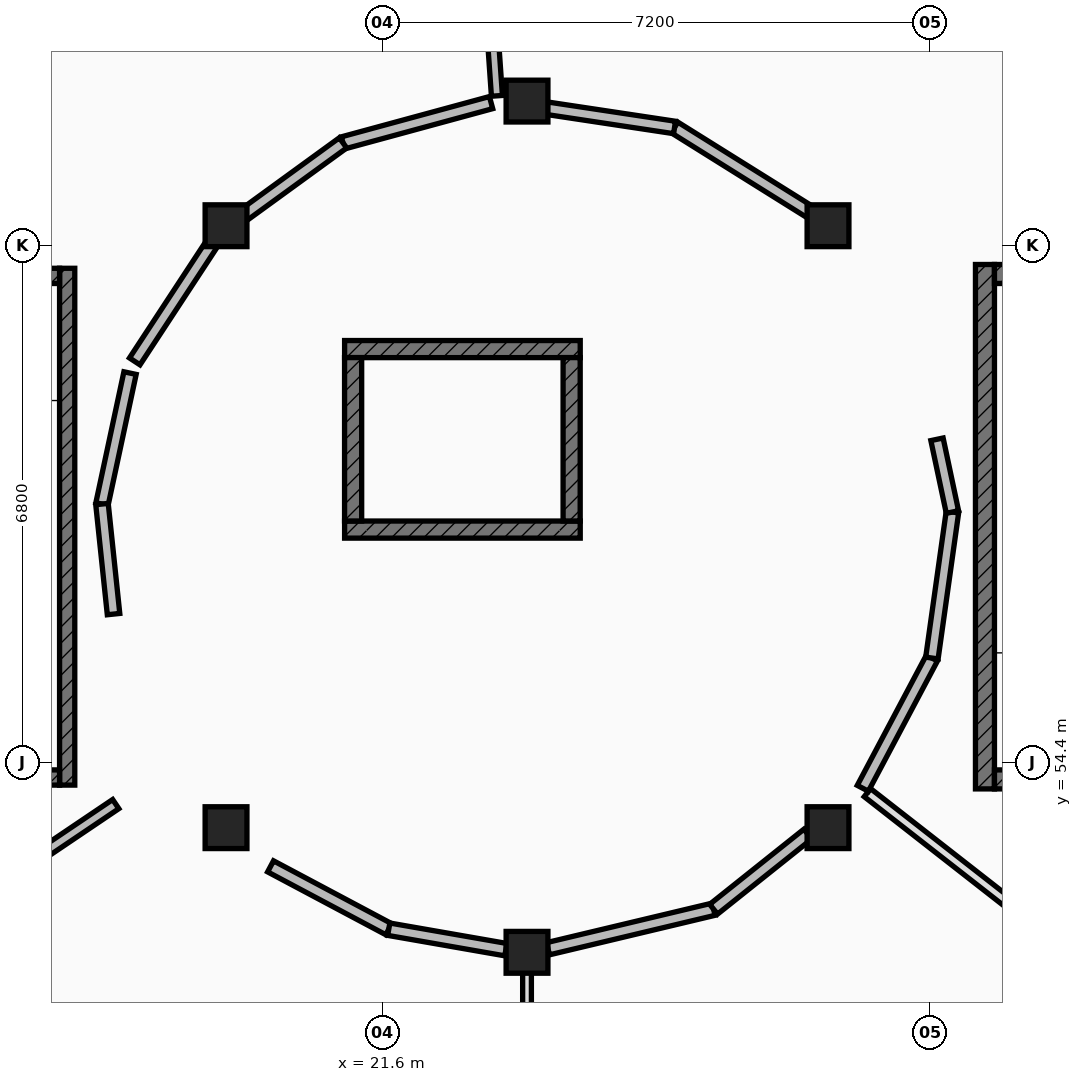
"""IFC4 building model, lengths in metres.
Left out: names, types, materials, properties, quantities, classifications, styles, units other than length and angle.
Written with IfcOpenShell. Run it as: python <this file> out.ifc"""

import sys

from ifc_helpers import new_model, si_unit, direction, frame, frame_2d, origin, origin_2d, place, context, subcontext, project, spatial, rectangle, extrude, element, fill, save


model = new_model("IFC4")
c1 = context("Model", 3, precision=1e-05, world=origin(), true_north=direction((0.0, 1.0)))
c2 = subcontext(c1, "Body", "Model", "MODEL_VIEW")
j1 = project(units=[si_unit("LENGTHUNIT", "METRE"), si_unit("PLANEANGLEUNIT", "RADIAN")], contexts=[c1])
p1 = place(None, origin())
s1 = spatial("IfcSite", under=j1, at=p1, CompositionType="ELEMENT")
p2 = place(p1, origin())
s2 = spatial("IfcBuilding", under=s1, at=p2, CompositionType="ELEMENT")
p3 = place(p2, frame((0.0, 0.0, -4.55)))
s3 = spatial("IfcBuildingStorey", under=s2, at=p3, CompositionType="ELEMENT", Elevation=-4.55)
for number, where, z_axis, x_axis in (
    (1, (27.46, 61.46, 0.0), (0.0, 0.0, 1.0), (1.0, 0.0, 0.0)),
    (2, (23.5, 63.1, 0.0), (0.0, 0.0, 1.0), (1.0, 0.0, 0.0)),
    (3, (19.54, 61.46, 0.0), (0.0, 0.0, 1.0), (1.0, 0.0, 0.0)),
    (4, (19.54, 53.54, 0.0), (0.0, 0.0, 1.0), (1.0, 0.0, 0.0)),
    (5, (23.5, 51.9, 0.0), (0.0, 0.0, 1.0), (1.0, 0.0, 0.0)),
    (6, (27.46, 53.54, 0.0), (0.0, 0.0, 1.0), (1.0, 0.0, 0.0)),
):
    element("IfcColumn", number, at=place(p3, frame(where, z_axis=z_axis, x_axis=x_axis)), inside=s3, PredefinedType="COLUMN", context=c2, shape_type="SweptSolid", body=[
        extrude(rectangle(XDim=0.55, YDim=0.55, at=origin_2d()), origin(), (0.0, 0.0, 1.0), 4.55),
    ])
p4 = place(p3, frame((29.525, 60.95, 0.0), z_axis=(0.0, 0.0, 1.0), x_axis=(0.0, -1.0, 0.0)))
e7 = element("IfcWall", 7, at=p4, inside=s3, PredefinedType="SHEAR", context=c2, shape_type="SweptSolid", body=[
    extrude(rectangle(XDim=6.9, YDim=0.25, at=frame_2d((3.45, 0.0))), origin(), (0.0, 0.0, 1.0), 4.135),
])
p5 = place(p4, frame((0.43, 0.0, 0.0)))
e8 = element("IfcOpeningElement", 8, at=p5, cuts=e7, PredefinedType="OPENING", context=c2, shape_type="SweptSolid", body=[
    extrude(rectangle(XDim=1.1, YDim=2.15, at=frame_2d((0.55, 1.075))), frame((0.0, 0.135, 0.0), z_axis=(0.0, -1.0, 0.0), x_axis=(1.0, 0.0, 0.0)), (0.0, 0.0, 1.0), 0.27),
])
for number, where, z_axis, x_axis in (
    (9, (29.65, 60.825, 0.0), (0.0, 0.0, 1.0), (1.0, 0.0, 0.0)),
    (10, (29.65, 54.175, 0.0), (0.0, 0.0, 1.0), (1.0, 0.0, 0.0)),
):
    element("IfcWall", number, at=place(p3, frame(where, z_axis=z_axis, x_axis=x_axis)), inside=s3, PredefinedType="SHEAR", context=c2, shape_type="SweptSolid", body=[
        extrude(rectangle(XDim=2.9, YDim=0.25, at=frame_2d((1.45, 0.0))), origin(), (0.0, 0.0, 1.0), 4.135),
    ])
p6 = place(p3, frame((17.45, 54.1, 0.0), z_axis=(0.0, 0.0, 1.0), x_axis=(0.0, 1.0, 0.0)))
e11 = element("IfcWall", 11, at=p6, inside=s3, PredefinedType="SHEAR", context=c2, shape_type="SweptSolid", body=[
    extrude(rectangle(XDim=6.8, YDim=0.2, at=frame_2d((3.4, 0.0))), origin(), (0.0, 0.0, 1.0), 4.135),
])
p7 = place(p6, frame((0.38, 0.0, 0.0)))
e12 = element("IfcOpeningElement", 12, at=p7, cuts=e11, PredefinedType="OPENING", context=c2, shape_type="SweptSolid", body=[
    extrude(rectangle(XDim=1.05, YDim=2.15, at=frame_2d((0.525, 1.075))), frame((0.0, 0.11, 0.0), z_axis=(0.0, -1.0, 0.0), x_axis=(1.0, 0.0, 0.0)), (0.0, 0.0, 1.0), 0.22),
])
for number, where, z_axis, x_axis in (
    (13, (17.35, 54.2, 0.0), (0.0, 0.0, 1.0), (-1.0, 0.0, 0.0)),
    (14, (17.35, 60.8, 0.0), (0.0, 0.0, 1.0), (-1.0, 0.0, 0.0)),
):
    element("IfcWall", number, at=place(p3, frame(where, z_axis=z_axis, x_axis=x_axis)), inside=s3, PredefinedType="SHEAR", context=c2, shape_type="SweptSolid", body=[
        extrude(rectangle(XDim=2.9, YDim=0.2, at=frame_2d((1.45, 0.0))), origin(), (0.0, 0.0, 1.0), 4.135),
    ])
p8 = place(p3, frame((21.1, 57.462, 0.0), z_axis=(0.0, 0.0, 1.0), x_axis=(1.0, 0.0, 0.0)))
e15 = element("IfcWall", 15, at=p8, inside=s3, PredefinedType="SHEAR", context=c2, shape_type="SweptSolid", body=[
    extrude(rectangle(XDim=3.1, YDim=0.225, at=frame_2d((1.55, 0.0))), origin(), (0.0, 0.0, 1.0), 4.135),
])
p9 = place(p8, frame((0.95, 0.0, 0.0)))
e16 = element("IfcOpeningElement", 16, at=p9, cuts=e15, PredefinedType="OPENING", context=c2, shape_type="SweptSolid", body=[
    extrude(rectangle(XDim=1.2, YDim=2.2, at=frame_2d((0.6, 1.1))), frame((0.0, 0.123, 0.0), z_axis=(0.0, -1.0, 0.0), x_axis=(1.0, 0.0, 0.0)), (0.0, 0.0, 1.0), 0.245),
])
p10 = place(p3, frame((21.1, 59.837, 0.0), z_axis=(0.0, 0.0, 1.0), x_axis=(1.0, 0.0, 0.0)))
e17 = element("IfcWall", 17, at=p10, inside=s3, PredefinedType="SHEAR", context=c2, shape_type="SweptSolid", body=[
    extrude(rectangle(XDim=3.1, YDim=0.225, at=frame_2d((1.55, 0.0))), origin(), (0.0, 0.0, 1.0), 4.135),
])
for number, where, z_axis, x_axis in (
    (18, (21.212, 57.575, 0.0), (0.0, 0.0, 1.0), (0.0, 1.0, 0.0)),
    (19, (24.087, 57.575, 0.0), (0.0, 0.0, 1.0), (0.0, 1.0, 0.0)),
):
    element("IfcWall", number, at=place(p3, frame(where, z_axis=z_axis, x_axis=x_axis)), inside=s3, PredefinedType="SHEAR", context=c2, shape_type="SweptSolid", body=[
        extrude(rectangle(XDim=2.15, YDim=0.225, at=frame_2d((1.075, 0.0))), origin(), (0.0, 0.0, 1.0), 4.135),
    ])
p11 = place(p3, frame((23.104, 63.169, 0.0), z_axis=(0.0, 0.0, 1.0), x_axis=(-0.069759335413, 0.997563850148, 0.0)))
e20 = element("IfcWall", 20, at=p11, inside=s3, PredefinedType="PARTITIONING", context=c2, shape_type="SweptSolid", body=[
    extrude(rectangle(XDim=4.56, YDim=0.145, at=frame_2d((2.28, 0.0))), origin(), (0.0, 0.0, 1.0), 3.31),
])
p12 = place(p3, frame((18.089, 53.85, 0.0), z_axis=(0.0, 0.0, 1.0), x_axis=(-0.828961502122, -0.559305665982, 0.0)))
e21 = element("IfcWall", 21, at=p12, inside=s3, PredefinedType="PARTITIONING", context=c2, shape_type="SweptSolid", body=[
    extrude(rectangle(XDim=3.712, YDim=0.145, at=frame_2d((1.856, 0.0))), origin(), (0.0, 0.0, 1.0), 3.31),
])
p13 = place(p3, frame((23.5, 51.817, 0.0), z_axis=(0.0, 0.0, 1.0), x_axis=(0.0, -1.0, 0.0)))
e22 = element("IfcWall", 22, at=p13, inside=s3, PredefinedType="PARTITIONING", context=c2, shape_type="SweptSolid", body=[
    extrude(rectangle(XDim=4.615, YDim=0.115, at=frame_2d((2.308, 0.0))), origin(), (0.0, 0.0, 1.0), 3.31),
])
p14 = place(p3, frame((27.978, 54.001, 0.0), z_axis=(0.0, 0.0, 1.0), x_axis=(0.788037233831, -0.615627580681, 0.0)))
e23 = element("IfcWall", 23, at=p14, inside=s3, PredefinedType="PLUMBINGWALL", context=c2, shape_type="SweptSolid", body=[
    extrude(rectangle(XDim=4.605, YDim=0.135, at=frame_2d((2.302, 0.0))), origin(), (0.0, 0.0, 1.0), 3.31),
])
p15 = place(p3, frame((27.238, 61.63, 0.0), z_axis=(0.0, 0.0, 1.0), x_axis=(-0.848030663633, 0.529947161081, 0.0)))
e24 = element("IfcWall", 24, at=p15, inside=s3, PredefinedType="PARTITIONING", context=c2, shape_type="SweptSolid", body=[
    extrude(rectangle(XDim=2.119, YDim=0.165, at=frame_2d((1.06, 0.0))), origin(), (0.0, 0.0, 1.0), 3.31),
])
p16 = place(p15, frame((0.469, 0.0, 0.0)))
e25 = element("IfcOpeningElement", 25, at=p16, cuts=e24, PredefinedType="OPENING", context=c2, shape_type="SweptSolid", body=[
    extrude(rectangle(XDim=1.18, YDim=2.2, at=frame_2d((0.59, 1.1))), frame((0.0, 0.093, 0.0), z_axis=(0.0, -1.0, 0.0), x_axis=(1.0, 0.0, 0.0)), (0.0, 0.0, 1.0), 0.185),
])
p17 = place(p3, frame((25.441, 62.753, 0.0), z_axis=(0.0, 0.0, 1.0), x_axis=(-0.988808298797, 0.149191649331, 0.0)))
e26 = element("IfcWall", 26, at=p17, inside=s3, PredefinedType="PARTITIONING", context=c2, shape_type="SweptSolid", body=[
    extrude(rectangle(XDim=1.697, YDim=0.165, at=frame_2d((0.849, 0.0))), origin(), (0.0, 0.0, 1.0), 3.31),
])
p18 = place(p3, frame((23.027, 63.08, 0.0), z_axis=(0.0, 0.0, 1.0), x_axis=(-0.964919932979, -0.262544325667, 0.0)))
e27 = element("IfcWall", 27, at=p18, inside=s3, PredefinedType="PARTITIONING", context=c2, shape_type="SweptSolid", body=[
    extrude(rectangle(XDim=2.019, YDim=0.165, at=frame_2d((1.009, 0.0))), origin(), (0.0, 0.0, 1.0), 3.31),
])
p19 = place(p18, frame((0.389, 0.0, 0.0)))
e28 = element("IfcOpeningElement", 28, at=p19, cuts=e27, PredefinedType="OPENING", context=c2, shape_type="SweptSolid", body=[
    extrude(rectangle(XDim=1.24, YDim=2.22, at=frame_2d((0.62, 1.11))), frame((0.0, 0.093, 0.0), z_axis=(0.0, -1.0, 0.0), x_axis=(1.0, 0.0, 0.0)), (0.0, 0.0, 1.0), 0.185),
])
p20 = place(p3, frame((21.079, 62.55, 0.0), z_axis=(0.0, 0.0, 1.0), x_axis=(-0.808860869398, -0.588000079895, 0.0)))
e29 = element("IfcWall", 29, at=p20, inside=s3, PredefinedType="PARTITIONING", context=c2, shape_type="SweptSolid", body=[
    extrude(rectangle(XDim=1.607, YDim=0.165, at=frame_2d((0.804, 0.0))), origin(), (0.0, 0.0, 1.0), 3.31),
])
p21 = place(p3, frame((19.366, 61.241, 0.0), z_axis=(0.0, 0.0, 1.0), x_axis=(-0.548365930053, -0.836238486771, 0.0)))
e30 = element("IfcWall", 30, at=p21, inside=s3, PredefinedType="PARTITIONING", context=c2, shape_type="SweptSolid", body=[
    extrude(rectangle(XDim=1.873, YDim=0.165, at=frame_2d((0.936, 0.0))), origin(), (0.0, 0.0, 1.0), 3.31),
])
p22 = place(p3, frame((18.277, 59.521, 0.0), z_axis=(0.0, 0.0, 1.0), x_axis=(-0.209500701014, -0.977808496729, 0.0)))
e31 = element("IfcWall", 31, at=p22, inside=s3, PredefinedType="PARTITIONING", context=c2, shape_type="SweptSolid", body=[
    extrude(rectangle(XDim=1.762, YDim=0.165, at=frame_2d((0.881, 0.0))), origin(), (0.0, 0.0, 1.0), 3.31),
])
p23 = place(p3, frame((17.908, 57.798, 0.0), z_axis=(0.0, 0.0, 1.0), x_axis=(0.10446656428, -0.994528399267, 0.0)))
e32 = element("IfcWall", 32, at=p23, inside=s3, PredefinedType="PARTITIONING", context=c2, shape_type="SweptSolid", body=[
    extrude(rectangle(XDim=1.456, YDim=0.165, at=frame_2d((0.728, 0.0))), origin(), (0.0, 0.0, 1.0), 3.31),
])
p24 = place(p3, frame((20.126, 53.031, 0.0), z_axis=(0.0, 0.0, 1.0), x_axis=(0.882916409472, -0.469530205508, 0.0)))
e33 = element("IfcWall", 33, at=p24, inside=s3, PredefinedType="PARTITIONING", context=c2, shape_type="SweptSolid", body=[
    extrude(rectangle(XDim=1.761, YDim=0.165, at=frame_2d((0.881, 0.0))), origin(), (0.0, 0.0, 1.0), 3.31),
])
p25 = place(p24, frame((0.221, 0.0, 0.0)))
e34 = element("IfcOpeningElement", 34, at=p25, cuts=e33, PredefinedType="OPENING", context=c2, shape_type="SweptSolid", body=[
    extrude(rectangle(XDim=1.32, YDim=2.24, at=frame_2d((0.66, 1.12))), frame((0.0, 0.093, 0.0), z_axis=(0.0, -1.0, 0.0), x_axis=(1.0, 0.0, 0.0)), (0.0, 0.0, 1.0), 0.185),
])
p26 = place(p3, frame((21.681, 52.204, 0.0), z_axis=(0.0, 0.0, 1.0), x_axis=(0.985099289187, -0.171986599601, 0.0)))
e35 = element("IfcWall", 35, at=p26, inside=s3, PredefinedType="PARTITIONING", context=c2, shape_type="SweptSolid", body=[
    extrude(rectangle(XDim=1.564, YDim=0.165, at=frame_2d((0.782, 0.0))), origin(), (0.0, 0.0, 1.0), 3.31),
])
p27 = place(p3, frame((23.776, 51.947, 0.0), z_axis=(0.0, 0.0, 1.0), x_axis=(0.972689167377, 0.232111575903, 0.0)))
e36 = element("IfcWall", 36, at=p27, inside=s3, PredefinedType="PARTITIONING", context=c2, shape_type="SweptSolid", body=[
    extrude(rectangle(XDim=2.24, YDim=0.165, at=frame_2d((1.12, 0.0))), origin(), (0.0, 0.0, 1.0), 3.31),
])
p28 = place(p27, frame((0.68, 0.0, 0.0)))
e37 = element("IfcOpeningElement", 37, at=p28, cuts=e36, PredefinedType="OPENING", context=c2, shape_type="SweptSolid", body=[
    extrude(rectangle(XDim=0.88, YDim=2.1, at=frame_2d((0.44, 1.05))), frame((0.0, 0.093, 0.0), z_axis=(0.0, -1.0, 0.0), x_axis=(1.0, 0.0, 0.0)), (0.0, 0.0, 1.0), 0.185),
])
p29 = place(p3, frame((25.955, 52.467, 0.0), z_axis=(0.0, 0.0, 1.0), x_axis=(0.781844808281, 0.623473091451, 0.0)))
e38 = element("IfcWall", 38, at=p29, inside=s3, PredefinedType="PARTITIONING", context=c2, shape_type="SweptSolid", body=[
    extrude(rectangle(XDim=1.585, YDim=0.165, at=frame_2d((0.792, 0.0))), origin(), (0.0, 0.0, 1.0), 3.31),
])
p30 = place(p3, frame((27.918, 54.058, 0.0), z_axis=(0.0, 0.0, 1.0), x_axis=(0.46852941816, 0.883447895644, 0.0)))
e39 = element("IfcWall", 39, at=p30, inside=s3, PredefinedType="PARTITIONING", context=c2, shape_type="SweptSolid", body=[
    extrude(rectangle(XDim=1.94, YDim=0.165, at=frame_2d((0.97, 0.0))), origin(), (0.0, 0.0, 1.0), 3.31),
])
p31 = place(p30, frame((0.48, 0.0, 0.0)))
e40 = element("IfcOpeningElement", 40, at=p31, cuts=e39, PredefinedType="OPENING", context=c2, shape_type="SweptSolid", body=[
    extrude(rectangle(XDim=0.98, YDim=2.1, at=frame_2d((0.49, 1.05))), frame((0.0, 0.093, 0.0), z_axis=(0.0, -1.0, 0.0), x_axis=(1.0, 0.0, 0.0)), (0.0, 0.0, 1.0), 0.185),
])
p32 = place(p3, frame((28.827, 55.772, 0.0), z_axis=(0.0, 0.0, 1.0), x_axis=(0.139183488293, 0.990266608842, 0.0)))
e41 = element("IfcWall", 41, at=p32, inside=s3, PredefinedType="PARTITIONING", context=c2, shape_type="SweptSolid", body=[
    extrude(rectangle(XDim=1.94, YDim=0.165, at=frame_2d((0.97, 0.0))), origin(), (0.0, 0.0, 1.0), 3.31),
])
p33 = place(p3, frame((29.097, 57.693, 0.0), z_axis=(0.0, 0.0, 1.0), x_axis=(-0.20743182321, 0.978249476729, 0.0)))
e42 = element("IfcWall", 42, at=p33, inside=s3, PredefinedType="PARTITIONING", context=c2, shape_type="SweptSolid", body=[
    extrude(rectangle(XDim=0.978, YDim=0.165, at=frame_2d((0.489, 0.0))), origin(), (0.0, 0.0, 1.0), 3.31),
])
p34 = place(p5, origin())
e43 = element("IfcDoor", 43, at=p34, inside=s3, OperationType="SINGLE_SWING_LEFT", PredefinedType="DOOR", context=c2, shape_type="SweptSolid", body=[
    extrude(rectangle(XDim=1.1, YDim=2.15, at=frame_2d((0.55, 1.075))), frame((0.0, 0.025, 0.0), z_axis=(0.0, -1.0, 0.0), x_axis=(1.0, 0.0, 0.0)), (0.0, 0.0, 1.0), 0.05),
])
fill(e8, e43)
p35 = place(p7, origin())
e44 = element("IfcDoor", 44, at=p35, inside=s3, OperationType="SINGLE_SWING_RIGHT", PredefinedType="DOOR", context=c2, shape_type="SweptSolid", body=[
    extrude(rectangle(XDim=1.05, YDim=2.15, at=frame_2d((0.525, 1.075))), frame((0.0, 0.025, 0.0), z_axis=(0.0, -1.0, 0.0), x_axis=(1.0, 0.0, 0.0)), (0.0, 0.0, 1.0), 0.05),
])
fill(e12, e44)
p36 = place(p9, origin())
e45 = element("IfcDoor", 45, at=p36, inside=s3, OperationType="DOUBLE_DOOR_SLIDING", PredefinedType="DOOR", context=c2, shape_type="SweptSolid", body=[
    extrude(rectangle(XDim=1.2, YDim=2.2, at=frame_2d((0.6, 1.1))), frame((0.0, 0.025, 0.0), z_axis=(0.0, -1.0, 0.0), x_axis=(1.0, 0.0, 0.0)), (0.0, 0.0, 1.0), 0.05),
])
fill(e16, e45)
p37 = place(p16, origin())
e46 = element("IfcDoor", 46, at=p37, inside=s3, OperationType="SINGLE_SWING_RIGHT", PredefinedType="DOOR", context=c2, shape_type="SweptSolid", body=[
    extrude(rectangle(XDim=1.18, YDim=2.2, at=frame_2d((0.59, 1.1))), frame((0.0, 0.025, 0.0), z_axis=(0.0, -1.0, 0.0), x_axis=(1.0, 0.0, 0.0)), (0.0, 0.0, 1.0), 0.05),
])
fill(e25, e46)
p38 = place(p19, origin())
e47 = element("IfcDoor", 47, at=p38, inside=s3, OperationType="SINGLE_SWING_LEFT", PredefinedType="DOOR", context=c2, shape_type="SweptSolid", body=[
    extrude(rectangle(XDim=1.24, YDim=2.22, at=frame_2d((0.62, 1.11))), frame((0.0, 0.025, 0.0), z_axis=(0.0, -1.0, 0.0), x_axis=(1.0, 0.0, 0.0)), (0.0, 0.0, 1.0), 0.05),
])
fill(e28, e47)
p39 = place(p25, origin())
e48 = element("IfcDoor", 48, at=p39, inside=s3, OperationType="SINGLE_SWING_RIGHT", PredefinedType="DOOR", context=c2, shape_type="SweptSolid", body=[
    extrude(rectangle(XDim=1.32, YDim=2.24, at=frame_2d((0.66, 1.12))), frame((0.0, 0.025, 0.0), z_axis=(0.0, -1.0, 0.0), x_axis=(1.0, 0.0, 0.0)), (0.0, 0.0, 1.0), 0.05),
])
fill(e34, e48)
p40 = place(p28, origin())
e49 = element("IfcDoor", 49, at=p40, inside=s3, OperationType="SINGLE_SWING_LEFT", PredefinedType="DOOR", context=c2, shape_type="SweptSolid", body=[
    extrude(rectangle(XDim=0.88, YDim=2.1, at=frame_2d((0.44, 1.05))), frame((0.0, 0.025, 0.0), z_axis=(0.0, -1.0, 0.0), x_axis=(1.0, 0.0, 0.0)), (0.0, 0.0, 1.0), 0.05),
])
fill(e37, e49)
p41 = place(p31, origin())
e50 = element("IfcDoor", 50, at=p41, inside=s3, OperationType="SINGLE_SWING_RIGHT", PredefinedType="DOOR", context=c2, shape_type="SweptSolid", body=[
    extrude(rectangle(XDim=0.98, YDim=2.1, at=frame_2d((0.49, 1.05))), frame((0.0, 0.025, 0.0), z_axis=(0.0, -1.0, 0.0), x_axis=(1.0, 0.0, 0.0)), (0.0, 0.0, 1.0), 0.05),
])
fill(e40, e50)
save(model, sys.argv[1])
